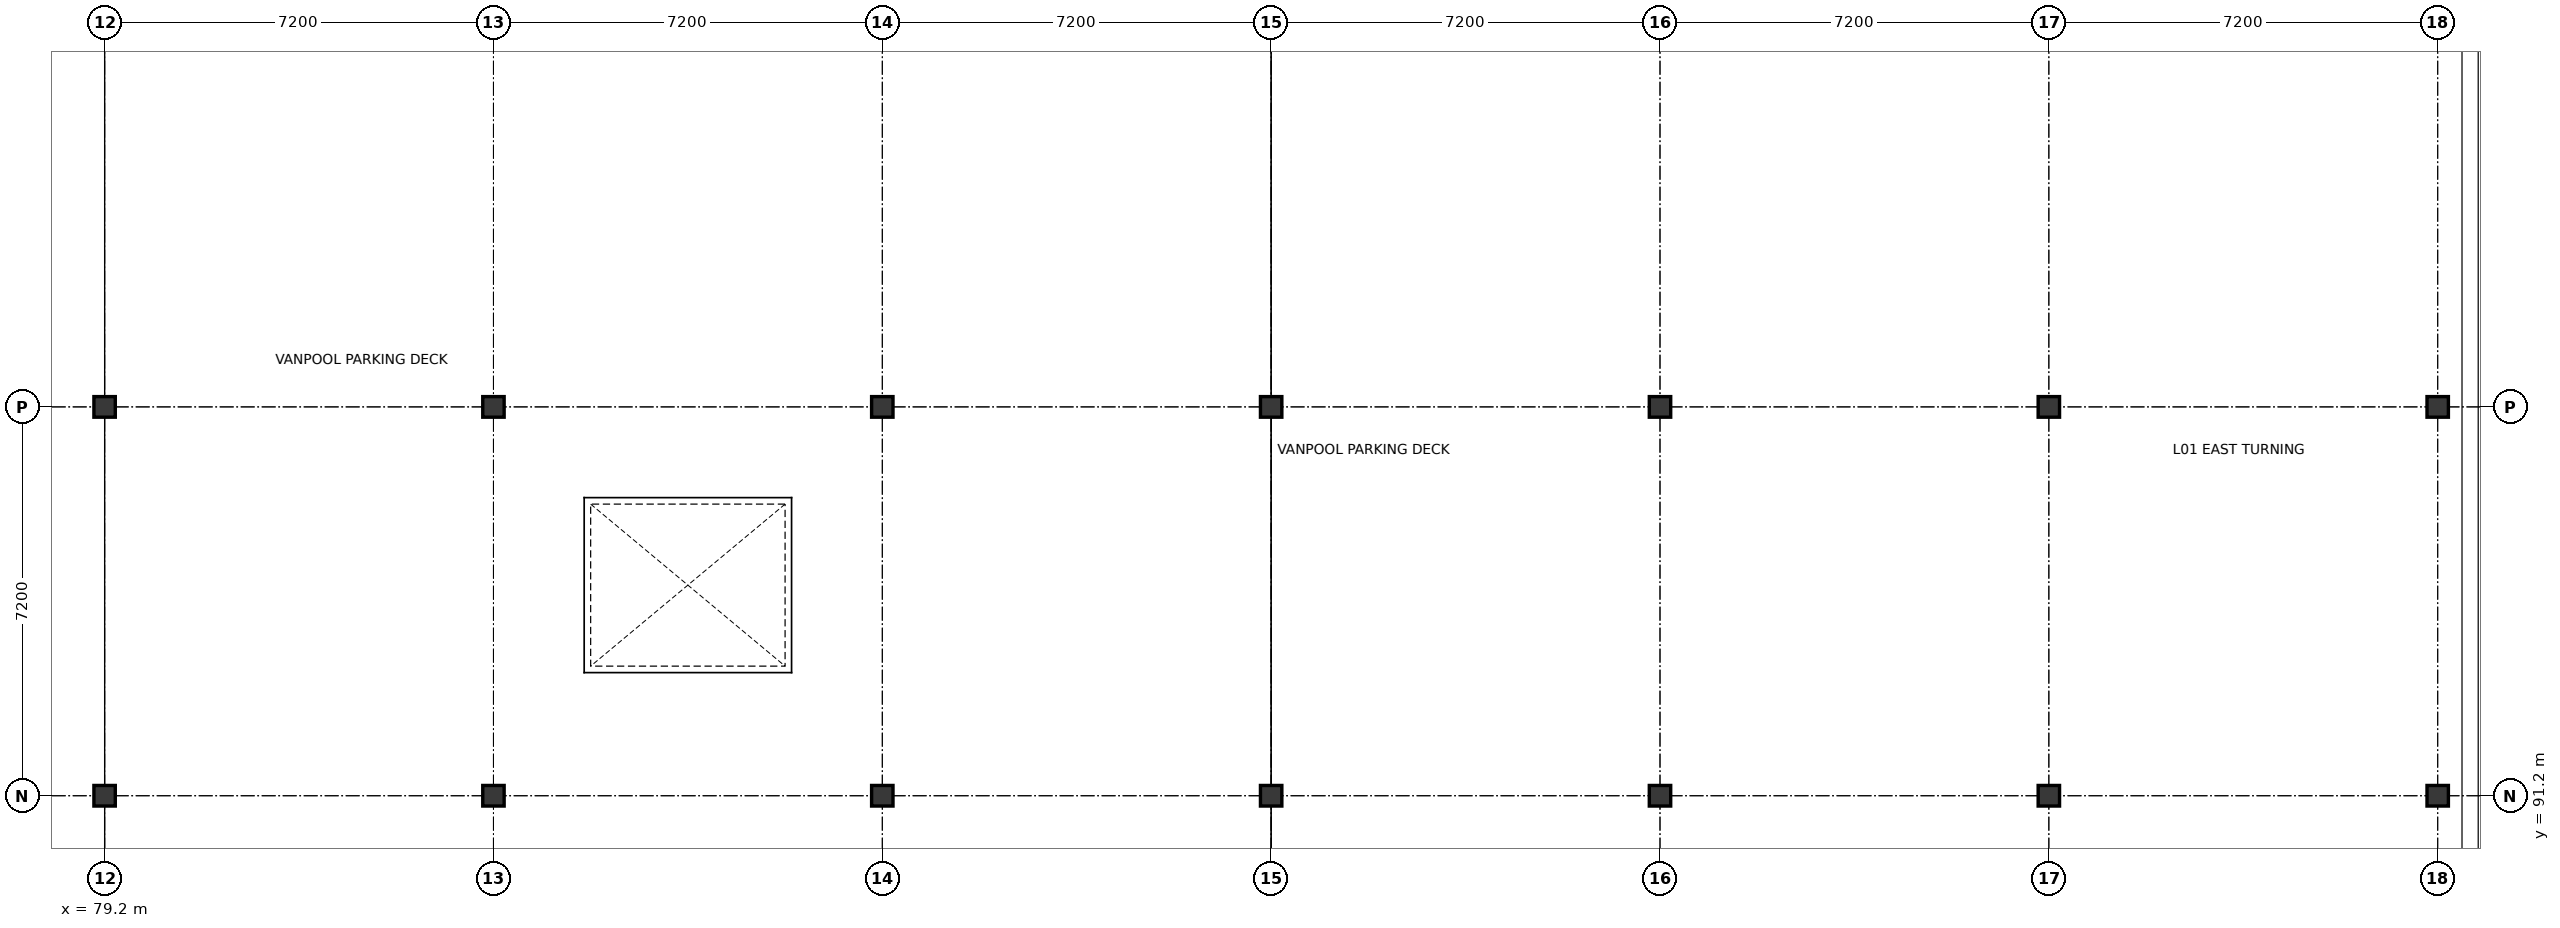
"""IFC4 building model, lengths in metres.
Left out: names, types, materials, properties, quantities, classifications, styles, units other than length and angle.
Written with IfcOpenShell. Run it as: python <this file> out.ifc"""

import sys

from ifc_helpers import new_model, si_unit, direction, frame, origin, origin_2d, place, context, subcontext, project, spatial, i_section, extrude, element, save


model = new_model("IFC4")
c1 = context("Model", 3, precision=1e-05, world=origin(), true_north=direction((0.0, 1.0)))
c2 = subcontext(c1, "Body", "Model", "MODEL_VIEW")
j1 = project(units=[si_unit("LENGTHUNIT", "METRE"), si_unit("PLANEANGLEUNIT", "RADIAN")], contexts=[c1])
p1 = place(None, origin())
s1 = spatial("IfcSite", under=j1, at=p1, CompositionType="ELEMENT")
p2 = place(p1, origin())
s2 = spatial("IfcBuilding", under=s1, at=p2, CompositionType="ELEMENT")
p3 = place(p2, frame((0.0, 0.0, 5.4)))
s3 = spatial("IfcBuildingStorey", under=s2, at=p3, CompositionType="ELEMENT", Elevation=5.4)
for number, where, z_axis, x_axis in (
    (1, (79.2, 91.2, 0.0), (0.0, 0.0, 1.0), (1.0, 0.0, 0.0)),
    (2, (79.2, 98.4, 0.0), (0.0, 0.0, 1.0), (1.0, 0.0, 0.0)),
    (3, (86.4, 91.2, 0.0), (0.0, 0.0, 1.0), (1.0, 0.0, 0.0)),
    (4, (86.4, 98.4, 0.0), (0.0, 0.0, 1.0), (1.0, 0.0, 0.0)),
    (5, (93.6, 91.2, 0.0), (0.0, 0.0, 1.0), (1.0, 0.0, 0.0)),
    (6, (93.6, 98.4, 0.0), (0.0, 0.0, 1.0), (1.0, 0.0, 0.0)),
    (7, (100.8, 91.2, 0.0), (0.0, 0.0, 1.0), (1.0, 0.0, 0.0)),
    (8, (100.8, 98.4, 0.0), (0.0, 0.0, 1.0), (1.0, 0.0, 0.0)),
    (9, (108.0, 91.2, 0.0), (0.0, 0.0, 1.0), (1.0, 0.0, 0.0)),
    (10, (108.0, 98.4, 0.0), (0.0, 0.0, 1.0), (1.0, 0.0, 0.0)),
    (11, (115.2, 91.2, 0.0), (0.0, 0.0, 1.0), (1.0, 0.0, 0.0)),
    (12, (115.2, 98.4, 0.0), (0.0, 0.0, 1.0), (1.0, 0.0, 0.0)),
    (13, (122.4, 91.2, 0.0), (0.0, 0.0, 1.0), (1.0, 0.0, 0.0)),
    (14, (122.4, 98.4, 0.0), (0.0, 0.0, 1.0), (1.0, 0.0, 0.0)),
):
    element("IfcColumn", number, at=place(p3, frame(where, z_axis=z_axis, x_axis=x_axis)), inside=s3, PredefinedType="COLUMN", context=c2, shape_type="SweptSolid", body=[
        extrude(i_section(OverallWidth=0.396, OverallDepth=0.381, WebThickness=0.019, FlangeThickness=0.03, FilletRadius=0.015, at=origin_2d()), origin(), (0.0, 0.0, 1.0), 3.9),
    ])
save(model, sys.argv[1])
